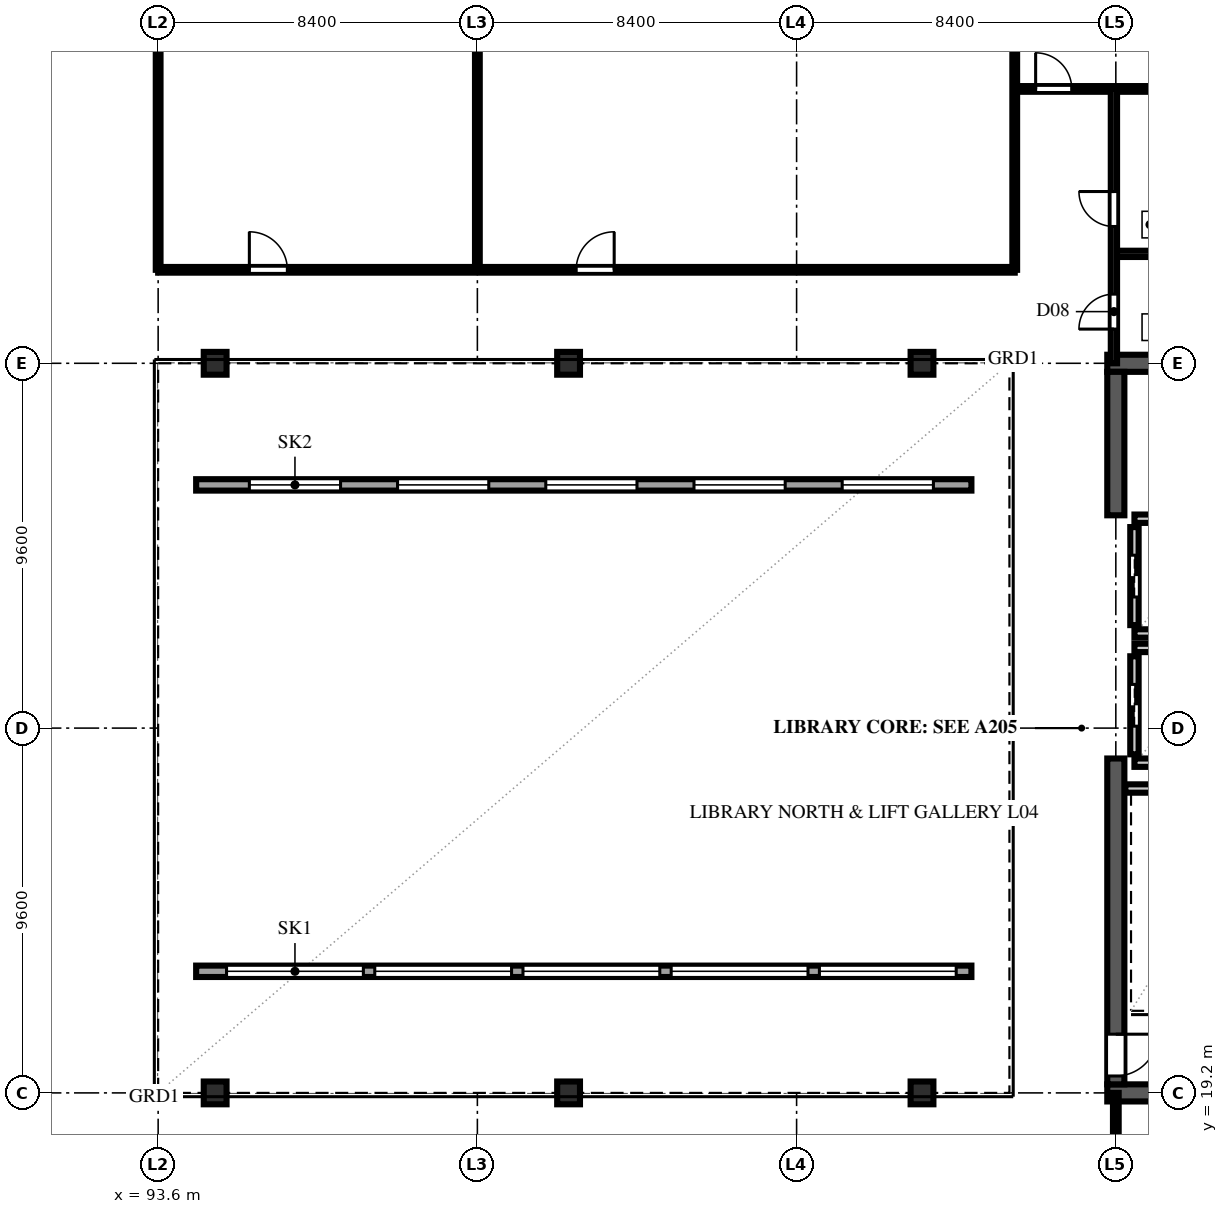
"""IFC4 building model, lengths in metres.
Left out: names, types, materials, properties, quantities, classifications, styles, units other than length and angle.
Written with IfcOpenShell. Run it as: python <this file> out.ifc"""

import sys

from ifc_helpers import new_model, si_unit, direction, frame, frame_2d, origin, origin_2d, place, context, subcontext, project, spatial, rectangle, extrude, element, fill, save


model = new_model("IFC4")
c1 = context("Model", 3, precision=1e-05, world=origin(), true_north=direction((0.0, 1.0)))
c2 = subcontext(c1, "Body", "Model", "MODEL_VIEW")
j1 = project(units=[si_unit("LENGTHUNIT", "METRE"), si_unit("PLANEANGLEUNIT", "RADIAN")], contexts=[c1])
p1 = place(None, origin())
s1 = spatial("IfcSite", under=j1, at=p1, CompositionType="ELEMENT")
p2 = place(p1, origin())
s2 = spatial("IfcBuilding", under=s1, at=p2, CompositionType="ELEMENT")
p3 = place(p2, frame((0.0, 0.0, 19.6)))
s3 = spatial("IfcBuildingStorey", under=s2, at=p3, CompositionType="ELEMENT", Elevation=19.6)
for number, where, z_axis, x_axis in (
    (1, (118.575, 19.2, 0.0), (0.0, 0.0, 1.0), (1.0, 0.0, 0.0)),
    (2, (118.575, 38.4, 0.0), (0.0, 0.0, 1.0), (1.0, 0.0, 0.0)),
):
    element("IfcWall", number, at=place(p3, frame(where, z_axis=z_axis, x_axis=x_axis)), inside=s3, PredefinedType="SHEAR", context=c2, shape_type="SweptSolid", body=[
        extrude(rectangle(XDim=7.2, YDim=0.45, at=frame_2d((3.6, 0.0))), origin(), (0.0, 0.0, 1.0), 4.32),
    ])
p4 = place(p3, frame((118.8, 19.425, 0.0), z_axis=(0.0, 0.0, 1.0), x_axis=(0.0, 1.0, 0.0)))
e3 = element("IfcWall", 3, at=p4, inside=s3, PredefinedType="SHEAR", context=c2, shape_type="SweptSolid", body=[
    extrude(rectangle(XDim=8.575, YDim=0.45, at=frame_2d((4.288, 0.0))), origin(), (0.0, 0.0, 1.0), 4.32),
])
p5 = place(p4, frame((0.22, 0.0, 0.0)))
e4 = element("IfcOpeningElement", 4, at=p5, cuts=e3, PredefinedType="OPENING", context=c2, shape_type="SweptSolid", body=[
    extrude(rectangle(XDim=1.1, YDim=2.2, at=frame_2d((0.55, 1.1))), frame((0.0, 0.237, 0.0), z_axis=(0.0, -1.0, 0.0), x_axis=(1.0, 0.0, 0.0)), (0.0, 0.0, 1.0), 0.474),
])
p6 = place(p3, frame((118.8, 34.4, 0.0), z_axis=(0.0, 0.0, 1.0), x_axis=(0.0, 1.0, 0.0)))
e5 = element("IfcWall", 5, at=p6, inside=s3, PredefinedType="SHEAR", context=c2, shape_type="SweptSolid", body=[
    extrude(rectangle(XDim=3.775, YDim=0.45, at=frame_2d((1.888, 0.0))), origin(), (0.0, 0.0, 1.0), 4.32),
])
for number, where, z_axis, x_axis in (
    (6, (95.1, 19.2, 0.0), (0.0, 0.0, 1.0), (1.0, 0.0, 0.0)),
    (7, (95.1, 38.4, 0.0), (0.0, 0.0, 1.0), (1.0, 0.0, 0.0)),
    (8, (104.4, 19.2, 0.0), (0.0, 0.0, 1.0), (1.0, 0.0, 0.0)),
    (9, (104.4, 38.4, 0.0), (0.0, 0.0, 1.0), (1.0, 0.0, 0.0)),
    (10, (113.7, 19.2, 0.0), (0.0, 0.0, 1.0), (1.0, 0.0, 0.0)),
    (11, (113.7, 38.4, 0.0), (0.0, 0.0, 1.0), (1.0, 0.0, 0.0)),
):
    element("IfcColumn", number, at=place(p3, frame(where, z_axis=z_axis, x_axis=x_axis)), inside=s3, PredefinedType="COLUMN", context=c2, shape_type="SweptSolid", body=[
        extrude(rectangle(XDim=0.6, YDim=0.6, at=origin_2d()), origin(), (0.0, 0.0, 1.0), 4.32),
    ])
p7 = place(p3, frame((94.6, 22.4, 4.6), z_axis=(0.0, 0.0, 1.0), x_axis=(1.0, 0.0, 0.0)))
e12 = element("IfcWall", 12, at=p7, inside=s3, PredefinedType="PARAPET", context=c2, shape_type="SweptSolid", body=[
    extrude(rectangle(XDim=20.4, YDim=0.3, at=frame_2d((10.2, 0.0))), origin(), (0.0, 0.0, 1.0), 4.2),
])
p8 = place(p7, frame((0.8, 0.0, 0.25)))
e13 = element("IfcOpeningElement", 13, at=p8, cuts=e12, PredefinedType="OPENING", context=c2, shape_type="SweptSolid", body=[
    extrude(rectangle(XDim=3.6, YDim=3.6, at=frame_2d((1.8, 1.8))), frame((0.0, 0.162, 0.0), z_axis=(0.0, -1.0, 0.0), x_axis=(1.0, 0.0, 0.0)), (0.0, 0.0, 1.0), 0.324),
])
p9 = place(p7, frame((4.7, 0.0, 0.25)))
e14 = element("IfcOpeningElement", 14, at=p9, cuts=e12, PredefinedType="OPENING", context=c2, shape_type="SweptSolid", body=[
    extrude(rectangle(XDim=3.6, YDim=3.6, at=frame_2d((1.8, 1.8))), frame((0.0, 0.162, 0.0), z_axis=(0.0, -1.0, 0.0), x_axis=(1.0, 0.0, 0.0)), (0.0, 0.0, 1.0), 0.324),
])
p10 = place(p7, frame((8.6, 0.0, 0.25)))
e15 = element("IfcOpeningElement", 15, at=p10, cuts=e12, PredefinedType="OPENING", context=c2, shape_type="SweptSolid", body=[
    extrude(rectangle(XDim=3.6, YDim=3.6, at=frame_2d((1.8, 1.8))), frame((0.0, 0.162, 0.0), z_axis=(0.0, -1.0, 0.0), x_axis=(1.0, 0.0, 0.0)), (0.0, 0.0, 1.0), 0.324),
])
p11 = place(p7, frame((12.5, 0.0, 0.25)))
e16 = element("IfcOpeningElement", 16, at=p11, cuts=e12, PredefinedType="OPENING", context=c2, shape_type="SweptSolid", body=[
    extrude(rectangle(XDim=3.6, YDim=3.6, at=frame_2d((1.8, 1.8))), frame((0.0, 0.162, 0.0), z_axis=(0.0, -1.0, 0.0), x_axis=(1.0, 0.0, 0.0)), (0.0, 0.0, 1.0), 0.324),
])
p12 = place(p7, frame((16.4, 0.0, 0.25)))
e17 = element("IfcOpeningElement", 17, at=p12, cuts=e12, PredefinedType="OPENING", context=c2, shape_type="SweptSolid", body=[
    extrude(rectangle(XDim=3.6, YDim=3.6, at=frame_2d((1.8, 1.8))), frame((0.0, 0.162, 0.0), z_axis=(0.0, -1.0, 0.0), x_axis=(1.0, 0.0, 0.0)), (0.0, 0.0, 1.0), 0.324),
])
p13 = place(p3, frame((94.6, 35.2, 4.6), z_axis=(0.0, 0.0, 1.0), x_axis=(1.0, 0.0, 0.0)))
e18 = element("IfcWall", 18, at=p13, inside=s3, PredefinedType="PARAPET", context=c2, shape_type="SweptSolid", body=[
    extrude(rectangle(XDim=20.4, YDim=0.3, at=frame_2d((10.2, 0.0))), origin(), (0.0, 0.0, 1.0), 4.2),
])
p14 = place(p13, frame((1.4, 0.0, 0.25)))
e19 = element("IfcOpeningElement", 19, at=p14, cuts=e18, PredefinedType="OPENING", context=c2, shape_type="SweptSolid", body=[
    extrude(rectangle(XDim=2.4, YDim=3.6, at=frame_2d((1.2, 1.8))), frame((0.0, 0.162, 0.0), z_axis=(0.0, -1.0, 0.0), x_axis=(1.0, 0.0, 0.0)), (0.0, 0.0, 1.0), 0.324),
])
p15 = place(p13, frame((5.3, 0.0, 0.25)))
e20 = element("IfcOpeningElement", 20, at=p15, cuts=e18, PredefinedType="OPENING", context=c2, shape_type="SweptSolid", body=[
    extrude(rectangle(XDim=2.4, YDim=3.6, at=frame_2d((1.2, 1.8))), frame((0.0, 0.162, 0.0), z_axis=(0.0, -1.0, 0.0), x_axis=(1.0, 0.0, 0.0)), (0.0, 0.0, 1.0), 0.324),
])
p16 = place(p13, frame((9.2, 0.0, 0.25)))
e21 = element("IfcOpeningElement", 21, at=p16, cuts=e18, PredefinedType="OPENING", context=c2, shape_type="SweptSolid", body=[
    extrude(rectangle(XDim=2.4, YDim=3.6, at=frame_2d((1.2, 1.8))), frame((0.0, 0.162, 0.0), z_axis=(0.0, -1.0, 0.0), x_axis=(1.0, 0.0, 0.0)), (0.0, 0.0, 1.0), 0.324),
])
p17 = place(p13, frame((13.1, 0.0, 0.25)))
e22 = element("IfcOpeningElement", 22, at=p17, cuts=e18, PredefinedType="OPENING", context=c2, shape_type="SweptSolid", body=[
    extrude(rectangle(XDim=2.4, YDim=3.6, at=frame_2d((1.2, 1.8))), frame((0.0, 0.162, 0.0), z_axis=(0.0, -1.0, 0.0), x_axis=(1.0, 0.0, 0.0)), (0.0, 0.0, 1.0), 0.324),
])
p18 = place(p13, frame((17.0, 0.0, 0.25)))
e23 = element("IfcOpeningElement", 23, at=p18, cuts=e18, PredefinedType="OPENING", context=c2, shape_type="SweptSolid", body=[
    extrude(rectangle(XDim=2.4, YDim=3.6, at=frame_2d((1.2, 1.8))), frame((0.0, 0.162, 0.0), z_axis=(0.0, -1.0, 0.0), x_axis=(1.0, 0.0, 0.0)), (0.0, 0.0, 1.0), 0.324),
])
p19 = place(p3, frame((119.05, 27.21, 0.0), z_axis=(0.0, 0.0, 1.0), x_axis=(1.0, 0.0, 0.0)))
e24 = element("IfcWall", 24, at=p19, inside=s3, PredefinedType="SOLIDWALL", context=c2, shape_type="SweptSolid", body=[
    extrude(rectangle(XDim=3.75, YDim=0.22, at=frame_2d((1.875, 0.0))), origin(), (0.0, 0.0, 1.0), 4.32),
])
p20 = place(p3, frame((119.29, 28.11, 0.0), z_axis=(0.0, 0.0, 1.0), x_axis=(0.0, 1.0, 0.0)))
e25 = element("IfcWall", 25, at=p20, inside=s3, PredefinedType="SOLIDWALL", context=c2, shape_type="SweptSolid", body=[
    extrude(rectangle(XDim=2.58, YDim=0.22, at=frame_2d((1.29, 0.0))), origin(), (0.0, 0.0, 1.0), 4.32),
])
p21 = place(p20, frame((0.74, 0.0, 0.0)))
e26 = element("IfcOpeningElement", 26, at=p21, cuts=e25, PredefinedType="OPENING", context=c2, shape_type="SweptSolid", body=[
    extrude(rectangle(XDim=1.1, YDim=2.2, at=frame_2d((0.55, 1.1))), frame((0.0, 0.122, 0.0), z_axis=(0.0, -1.0, 0.0), x_axis=(1.0, 0.0, 0.0)), (0.0, 0.0, 1.0), 0.244),
])
for number, where, z_axis, x_axis in (
    (27, (119.29, 27.89, 0.0), (0.0, 0.0, 1.0), (1.0, 0.0, 0.0)),
    (28, (119.29, 30.91, 0.0), (0.0, 0.0, 1.0), (1.0, 0.0, 0.0)),
):
    element("IfcWall", number, at=place(p3, frame(where, z_axis=z_axis, x_axis=x_axis)), inside=s3, PredefinedType="SOLIDWALL", context=c2, shape_type="SweptSolid", body=[
        extrude(rectangle(XDim=2.62, YDim=0.22, at=frame_2d((1.31, 0.0))), origin(), (0.0, 0.0, 1.0), 4.32),
    ])
p22 = place(p3, frame((119.29, 31.51, 0.0), z_axis=(0.0, 0.0, 1.0), x_axis=(0.0, 1.0, 0.0)))
e29 = element("IfcWall", 29, at=p22, inside=s3, PredefinedType="SOLIDWALL", context=c2, shape_type="SweptSolid", body=[
    extrude(rectangle(XDim=2.58, YDim=0.22, at=frame_2d((1.29, 0.0))), origin(), (0.0, 0.0, 1.0), 4.32),
])
p23 = place(p22, frame((0.74, 0.0, 0.0)))
e30 = element("IfcOpeningElement", 30, at=p23, cuts=e29, PredefinedType="OPENING", context=c2, shape_type="SweptSolid", body=[
    extrude(rectangle(XDim=1.1, YDim=2.2, at=frame_2d((0.55, 1.1))), frame((0.0, 0.122, 0.0), z_axis=(0.0, -1.0, 0.0), x_axis=(1.0, 0.0, 0.0)), (0.0, 0.0, 1.0), 0.244),
])
for number, where, z_axis, x_axis in (
    (31, (119.29, 31.29, 0.0), (0.0, 0.0, 1.0), (1.0, 0.0, 0.0)),
    (32, (119.29, 34.31, 0.0), (0.0, 0.0, 1.0), (1.0, 0.0, 0.0)),
):
    element("IfcWall", number, at=place(p3, frame(where, z_axis=z_axis, x_axis=x_axis)), inside=s3, PredefinedType="SOLIDWALL", context=c2, shape_type="SweptSolid", body=[
        extrude(rectangle(XDim=2.62, YDim=0.22, at=frame_2d((1.31, 0.0))), origin(), (0.0, 0.0, 1.0), 4.32),
    ])
p24 = place(p3, frame((118.8, 16.74, 0.0), z_axis=(0.0, 0.0, 1.0), x_axis=(0.0, 1.0, 0.0)))
e33 = element("IfcWall", 33, at=p24, inside=s3, PredefinedType="PARTITIONING", context=c2, shape_type="SweptSolid", body=[
    extrude(rectangle(XDim=2.46, YDim=0.15, at=frame_2d((1.23, 0.0))), origin(), (0.0, 0.0, 1.0), 4.32),
])
for number, where, z_axis, x_axis in (
    (34, (93.6, 40.86, 0.0), (0.0, 0.0, 1.0), (0.0, 1.0, 0.0)),
    (35, (102.0, 40.86, 0.0), (0.0, 0.0, 1.0), (0.0, 1.0, 0.0)),
    (36, (116.14, 40.86, 0.0), (0.0, 0.0, 1.0), (0.0, 1.0, 0.0)),
):
    element("IfcWall", number, at=place(p3, frame(where, z_axis=z_axis, x_axis=x_axis)), inside=s3, PredefinedType="PARTITIONING", context=c2, shape_type="SweptSolid", body=[
        extrude(rectangle(XDim=16.39, YDim=0.125, at=frame_2d((8.195, 0.0))), origin(), (0.0, 0.0, 1.0), 4.32),
    ])
p25 = place(p3, frame((93.6, 40.86, 0.0), z_axis=(0.0, 0.0, 1.0), x_axis=(1.0, 0.0, 0.0)))
e37 = element("IfcWall", 37, at=p25, inside=s3, PredefinedType="PARTITIONING", context=c2, shape_type="SweptSolid", body=[
    extrude(rectangle(XDim=22.54, YDim=0.15, at=frame_2d((11.27, 0.0))), origin(), (0.0, 0.0, 1.0), 4.32),
])
p26 = place(p25, frame((2.4, 0.0, 0.0)))
e38 = element("IfcOpeningElement", 38, at=p26, cuts=e37, PredefinedType="OPENING", context=c2, shape_type="SweptSolid", body=[
    extrude(rectangle(XDim=1.0, YDim=2.2, at=frame_2d((0.5, 1.1))), frame((0.0, 0.087, 0.0), z_axis=(0.0, -1.0, 0.0), x_axis=(1.0, 0.0, 0.0)), (0.0, 0.0, 1.0), 0.174),
])
p27 = place(p25, frame((11.0, 0.0, 0.0)))
e39 = element("IfcOpeningElement", 39, at=p27, cuts=e37, PredefinedType="OPENING", context=c2, shape_type="SweptSolid", body=[
    extrude(rectangle(XDim=1.0, YDim=2.2, at=frame_2d((0.5, 1.1))), frame((0.0, 0.087, 0.0), z_axis=(0.0, -1.0, 0.0), x_axis=(1.0, 0.0, 0.0)), (0.0, 0.0, 1.0), 0.174),
])
p28 = place(p3, frame((118.75, 41.28, 0.0), z_axis=(0.0, 0.0, 1.0), x_axis=(1.0, 0.0, 0.0)))
e40 = element("IfcWall", 40, at=p28, inside=s3, PredefinedType="PLUMBINGWALL", context=c2, shape_type="SweptSolid", body=[
    extrude(rectangle(XDim=8.1, YDim=0.165, at=frame_2d((4.05, 0.0))), origin(), (0.0, 0.0, 1.0), 4.32),
])
p29 = place(p3, frame((116.14, 45.62, 0.0), z_axis=(0.0, 0.0, 1.0), x_axis=(1.0, 0.0, 0.0)))
e41 = element("IfcWall", 41, at=p29, inside=s3, PredefinedType="PARTITIONING", context=c2, shape_type="SweptSolid", body=[
    extrude(rectangle(XDim=10.71, YDim=0.15, at=frame_2d((5.355, 0.0))), origin(), (0.0, 0.0, 1.0), 4.32),
])
p30 = place(p29, frame((0.55, 0.0, 0.0)))
e42 = element("IfcOpeningElement", 42, at=p30, cuts=e41, PredefinedType="OPENING", context=c2, shape_type="SweptSolid", body=[
    extrude(rectangle(XDim=0.95, YDim=2.15, at=frame_2d((0.475, 1.075))), frame((0.0, 0.087, 0.0), z_axis=(0.0, -1.0, 0.0), x_axis=(1.0, 0.0, 0.0)), (0.0, 0.0, 1.0), 0.174),
])
p31 = place(p3, frame((118.75, 38.4, 0.0), z_axis=(0.0, 0.0, 1.0), x_axis=(0.0, 1.0, 0.0)))
e43 = element("IfcWall", 43, at=p31, inside=s3, PredefinedType="PLUMBINGWALL", context=c2, shape_type="SweptSolid", body=[
    extrude(rectangle(XDim=7.22, YDim=0.165, at=frame_2d((3.61, 0.0))), origin(), (0.0, 0.0, 1.0), 4.32),
])
p32 = place(p31, frame((0.9, 0.0, 0.0)))
e44 = element("IfcOpeningElement", 44, at=p32, cuts=e43, PredefinedType="OPENING", context=c2, shape_type="SweptSolid", body=[
    extrude(rectangle(XDim=0.92, YDim=2.15, at=frame_2d((0.46, 1.075))), frame((0.0, 0.094, 0.0), z_axis=(0.0, -1.0, 0.0), x_axis=(1.0, 0.0, 0.0)), (0.0, 0.0, 1.0), 0.189),
])
p33 = place(p31, frame((3.6, 0.0, 0.0)))
e45 = element("IfcOpeningElement", 45, at=p33, cuts=e43, PredefinedType="OPENING", context=c2, shape_type="SweptSolid", body=[
    extrude(rectangle(XDim=0.92, YDim=2.15, at=frame_2d((0.46, 1.075))), frame((0.0, 0.094, 0.0), z_axis=(0.0, -1.0, 0.0), x_axis=(1.0, 0.0, 0.0)), (0.0, 0.0, 1.0), 0.189),
])
p34 = place(p8, origin())
e46 = element("IfcWindow", 46, at=p34, inside=s3, PartitioningType="SINGLE_PANEL", PredefinedType="SKYLIGHT", context=c2, shape_type="SweptSolid", body=[
    extrude(rectangle(XDim=3.6, YDim=3.6, at=frame_2d((1.8, 1.8))), frame((0.0, 0.03, 0.0), z_axis=(0.0, -1.0, 0.0), x_axis=(1.0, 0.0, 0.0)), (0.0, 0.0, 1.0), 0.06),
])
fill(e13, e46)
p35 = place(p14, origin())
e47 = element("IfcWindow", 47, at=p35, inside=s3, PartitioningType="SINGLE_PANEL", PredefinedType="SKYLIGHT", context=c2, shape_type="SweptSolid", body=[
    extrude(rectangle(XDim=2.4, YDim=3.6, at=frame_2d((1.2, 1.8))), frame((0.0, 0.03, 0.0), z_axis=(0.0, -1.0, 0.0), x_axis=(1.0, 0.0, 0.0)), (0.0, 0.0, 1.0), 0.06),
])
fill(e19, e47)
p36 = place(p9, origin())
e48 = element("IfcWindow", 48, at=p36, inside=s3, PartitioningType="SINGLE_PANEL", PredefinedType="SKYLIGHT", context=c2, shape_type="SweptSolid", body=[
    extrude(rectangle(XDim=3.6, YDim=3.6, at=frame_2d((1.8, 1.8))), frame((0.0, 0.03, 0.0), z_axis=(0.0, -1.0, 0.0), x_axis=(1.0, 0.0, 0.0)), (0.0, 0.0, 1.0), 0.06),
])
fill(e14, e48)
p37 = place(p15, origin())
e49 = element("IfcWindow", 49, at=p37, inside=s3, PartitioningType="SINGLE_PANEL", PredefinedType="SKYLIGHT", context=c2, shape_type="SweptSolid", body=[
    extrude(rectangle(XDim=2.4, YDim=3.6, at=frame_2d((1.2, 1.8))), frame((0.0, 0.03, 0.0), z_axis=(0.0, -1.0, 0.0), x_axis=(1.0, 0.0, 0.0)), (0.0, 0.0, 1.0), 0.06),
])
fill(e20, e49)
p38 = place(p10, origin())
e50 = element("IfcWindow", 50, at=p38, inside=s3, PartitioningType="SINGLE_PANEL", PredefinedType="SKYLIGHT", context=c2, shape_type="SweptSolid", body=[
    extrude(rectangle(XDim=3.6, YDim=3.6, at=frame_2d((1.8, 1.8))), frame((0.0, 0.03, 0.0), z_axis=(0.0, -1.0, 0.0), x_axis=(1.0, 0.0, 0.0)), (0.0, 0.0, 1.0), 0.06),
])
fill(e15, e50)
p39 = place(p16, origin())
e51 = element("IfcWindow", 51, at=p39, inside=s3, PartitioningType="SINGLE_PANEL", PredefinedType="SKYLIGHT", context=c2, shape_type="SweptSolid", body=[
    extrude(rectangle(XDim=2.4, YDim=3.6, at=frame_2d((1.2, 1.8))), frame((0.0, 0.03, 0.0), z_axis=(0.0, -1.0, 0.0), x_axis=(1.0, 0.0, 0.0)), (0.0, 0.0, 1.0), 0.06),
])
fill(e21, e51)
p40 = place(p11, origin())
e52 = element("IfcWindow", 52, at=p40, inside=s3, PartitioningType="SINGLE_PANEL", PredefinedType="SKYLIGHT", context=c2, shape_type="SweptSolid", body=[
    extrude(rectangle(XDim=3.6, YDim=3.6, at=frame_2d((1.8, 1.8))), frame((0.0, 0.03, 0.0), z_axis=(0.0, -1.0, 0.0), x_axis=(1.0, 0.0, 0.0)), (0.0, 0.0, 1.0), 0.06),
])
fill(e16, e52)
p41 = place(p17, origin())
e53 = element("IfcWindow", 53, at=p41, inside=s3, PartitioningType="SINGLE_PANEL", PredefinedType="SKYLIGHT", context=c2, shape_type="SweptSolid", body=[
    extrude(rectangle(XDim=2.4, YDim=3.6, at=frame_2d((1.2, 1.8))), frame((0.0, 0.03, 0.0), z_axis=(0.0, -1.0, 0.0), x_axis=(1.0, 0.0, 0.0)), (0.0, 0.0, 1.0), 0.06),
])
fill(e22, e53)
p42 = place(p12, origin())
e54 = element("IfcWindow", 54, at=p42, inside=s3, PartitioningType="SINGLE_PANEL", PredefinedType="SKYLIGHT", context=c2, shape_type="SweptSolid", body=[
    extrude(rectangle(XDim=3.6, YDim=3.6, at=frame_2d((1.8, 1.8))), frame((0.0, 0.03, 0.0), z_axis=(0.0, -1.0, 0.0), x_axis=(1.0, 0.0, 0.0)), (0.0, 0.0, 1.0), 0.06),
])
fill(e17, e54)
p43 = place(p18, origin())
e55 = element("IfcWindow", 55, at=p43, inside=s3, PartitioningType="SINGLE_PANEL", PredefinedType="SKYLIGHT", context=c2, shape_type="SweptSolid", body=[
    extrude(rectangle(XDim=2.4, YDim=3.6, at=frame_2d((1.2, 1.8))), frame((0.0, 0.03, 0.0), z_axis=(0.0, -1.0, 0.0), x_axis=(1.0, 0.0, 0.0)), (0.0, 0.0, 1.0), 0.06),
])
fill(e23, e55)
p44 = place(p5, frame((1.1, 0.0, 0.0), z_axis=(0.0, 0.0, 1.0), x_axis=(-1.0, 0.0, 0.0)))
e56 = element("IfcDoor", 56, at=p44, inside=s3, OperationType="SINGLE_SWING_LEFT", PredefinedType="DOOR", context=c2, shape_type="SweptSolid", body=[
    extrude(rectangle(XDim=1.1, YDim=2.2, at=frame_2d((0.55, 1.1))), frame((0.0, 0.025, 0.0), z_axis=(0.0, -1.0, 0.0), x_axis=(1.0, 0.0, 0.0)), (0.0, 0.0, 1.0), 0.05),
])
fill(e4, e56)
p45 = place(p21, origin())
e57 = element("IfcDoor", 57, at=p45, inside=s3, OperationType="DOUBLE_DOOR_SLIDING", PredefinedType="DOOR", context=c2, shape_type="SweptSolid", body=[
    extrude(rectangle(XDim=1.1, YDim=2.2, at=frame_2d((0.55, 1.1))), frame((0.0, 0.025, 0.0), z_axis=(0.0, -1.0, 0.0), x_axis=(1.0, 0.0, 0.0)), (0.0, 0.0, 1.0), 0.05),
])
fill(e26, e57)
p46 = place(p23, origin())
e58 = element("IfcDoor", 58, at=p46, inside=s3, OperationType="DOUBLE_DOOR_SLIDING", PredefinedType="DOOR", context=c2, shape_type="SweptSolid", body=[
    extrude(rectangle(XDim=1.1, YDim=2.2, at=frame_2d((0.55, 1.1))), frame((0.0, 0.025, 0.0), z_axis=(0.0, -1.0, 0.0), x_axis=(1.0, 0.0, 0.0)), (0.0, 0.0, 1.0), 0.05),
])
fill(e30, e58)
p47 = place(p26, origin())
e59 = element("IfcDoor", 59, at=p47, inside=s3, OperationType="SINGLE_SWING_LEFT", PredefinedType="DOOR", context=c2, shape_type="SweptSolid", body=[
    extrude(rectangle(XDim=1.0, YDim=2.2, at=frame_2d((0.5, 1.1))), frame((0.0, 0.025, 0.0), z_axis=(0.0, -1.0, 0.0), x_axis=(1.0, 0.0, 0.0)), (0.0, 0.0, 1.0), 0.05),
])
fill(e38, e59)
p48 = place(p27, origin())
e60 = element("IfcDoor", 60, at=p48, inside=s3, OperationType="SINGLE_SWING_RIGHT", PredefinedType="DOOR", context=c2, shape_type="SweptSolid", body=[
    extrude(rectangle(XDim=1.0, YDim=2.2, at=frame_2d((0.5, 1.1))), frame((0.0, 0.025, 0.0), z_axis=(0.0, -1.0, 0.0), x_axis=(1.0, 0.0, 0.0)), (0.0, 0.0, 1.0), 0.05),
])
fill(e39, e60)
p49 = place(p30, origin())
e61 = element("IfcDoor", 61, at=p49, inside=s3, OperationType="SINGLE_SWING_LEFT", PredefinedType="DOOR", context=c2, shape_type="SweptSolid", body=[
    extrude(rectangle(XDim=0.95, YDim=2.15, at=frame_2d((0.475, 1.075))), frame((0.0, 0.025, 0.0), z_axis=(0.0, -1.0, 0.0), x_axis=(1.0, 0.0, 0.0)), (0.0, 0.0, 1.0), 0.05),
])
fill(e42, e61)
p50 = place(p32, origin())
e62 = element("IfcDoor", 62, at=p50, inside=s3, OperationType="SINGLE_SWING_LEFT", PredefinedType="DOOR", context=c2, shape_type="SweptSolid", body=[
    extrude(rectangle(XDim=0.92, YDim=2.15, at=frame_2d((0.46, 1.075))), frame((0.0, 0.025, 0.0), z_axis=(0.0, -1.0, 0.0), x_axis=(1.0, 0.0, 0.0)), (0.0, 0.0, 1.0), 0.05),
])
fill(e44, e62)
p51 = place(p33, origin())
e63 = element("IfcDoor", 63, at=p51, inside=s3, OperationType="SINGLE_SWING_RIGHT", PredefinedType="DOOR", context=c2, shape_type="SweptSolid", body=[
    extrude(rectangle(XDim=0.92, YDim=2.15, at=frame_2d((0.46, 1.075))), frame((0.0, 0.025, 0.0), z_axis=(0.0, -1.0, 0.0), x_axis=(1.0, 0.0, 0.0)), (0.0, 0.0, 1.0), 0.05),
])
fill(e45, e63)
save(model, sys.argv[1])
